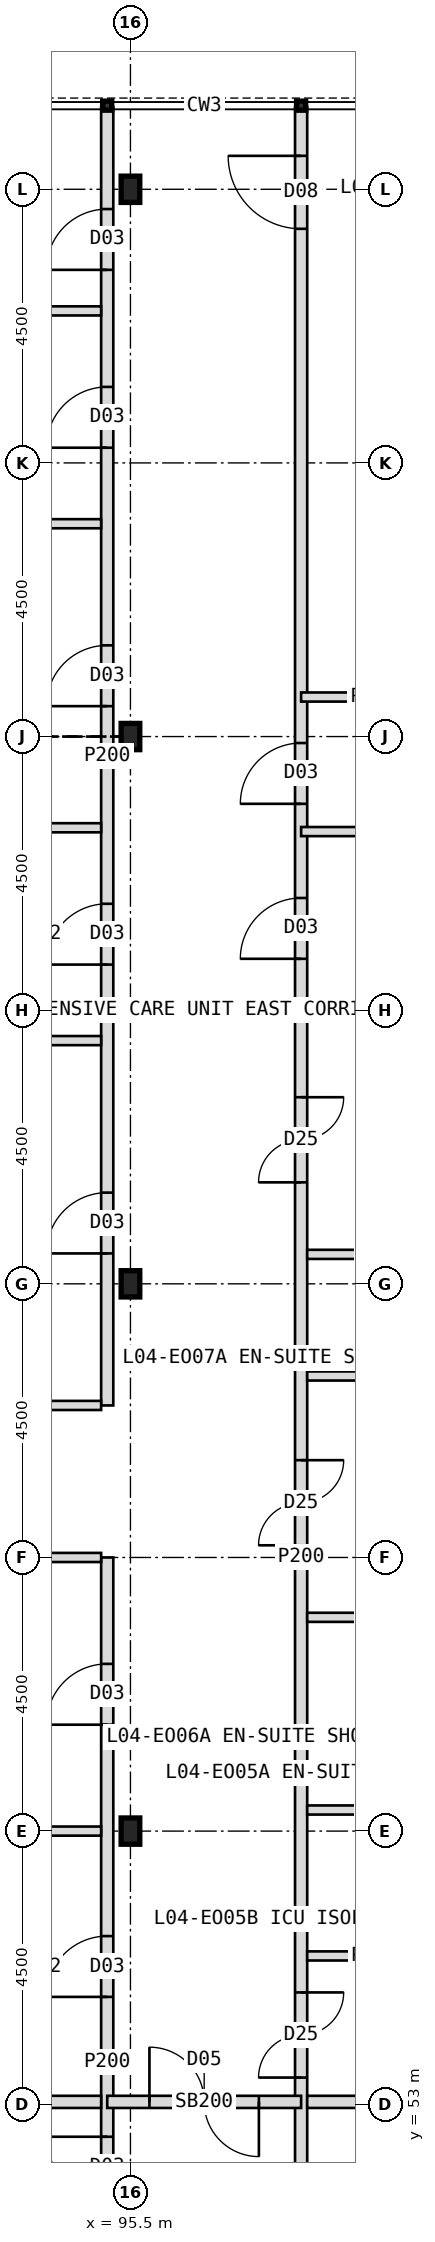
"""IFC4 building model, lengths in metres.
Left out: names, types, materials, properties, quantities, classifications, styles, units other than length and angle.
Written with IfcOpenShell. Run it as: python <this file> out.ifc"""

import sys

from ifc_helpers import new_model, si_unit, direction, frame, frame_2d, origin, origin_2d, place, context, subcontext, project, spatial, rectangle, i_section, extrude, element, fill, save


model = new_model("IFC4")
c1 = context("Model", 3, precision=1e-05, world=origin(), true_north=direction((0.0, 1.0)))
c2 = subcontext(c1, "Body", "Model", "MODEL_VIEW")
j1 = project(units=[si_unit("LENGTHUNIT", "METRE"), si_unit("PLANEANGLEUNIT", "RADIAN")], contexts=[c1])
p1 = place(None, origin())
s1 = spatial("IfcSite", under=j1, at=p1, CompositionType="ELEMENT")
p2 = place(p1, origin())
s2 = spatial("IfcBuilding", under=s1, at=p2, CompositionType="ELEMENT")
p3 = place(p2, frame((0.0, 0.0, 21.0)))
s3 = spatial("IfcBuildingStorey", under=s2, at=p3, CompositionType="ELEMENT", Elevation=21.0)
for number, where, z_axis, x_axis in (
    (1, (95.5, 57.5, 0.0), (0.0, 0.0, 1.0), (1.0, 0.0, 0.0)),
    (2, (95.5, 66.5, 0.0), (0.0, 0.0, 1.0), (1.0, 0.0, 0.0)),
    (3, (95.5, 75.5, 0.0), (0.0, 0.0, 1.0), (1.0, 0.0, 0.0)),
    (4, (95.5, 84.5, 0.0), (0.0, 0.0, 1.0), (1.0, 0.0, 0.0)),
):
    element("IfcColumn", number, at=place(p3, frame(where, z_axis=z_axis, x_axis=x_axis)), inside=s3, PredefinedType="COLUMN", context=c2, shape_type="SweptSolid", body=[
        extrude(i_section(OverallWidth=0.307, OverallDepth=0.432, WebThickness=0.021, FlangeThickness=0.04, FilletRadius=0.027, at=origin_2d()), origin(), (0.0, 0.0, 1.0), 5.0),
    ])
p4 = place(p3, frame((98.307, 38.15, 0.0), z_axis=(0.0, 0.0, 1.0), x_axis=(0.0, 1.0, 0.0)))
e5 = element("IfcWall", 5, at=p4, inside=s3, PredefinedType="PARTITIONING", context=c2, shape_type="SweptSolid", body=[
    extrude(rectangle(XDim=47.7, YDim=0.2, at=frame_2d((23.85, 0.0))), origin(), (0.0, 0.0, 1.0), 4.7),
])
p5 = place(p4, frame((45.7, 0.0, 0.0)))
e6 = element("IfcOpeningElement", 6, at=p5, cuts=e5, PredefinedType="OPENING", context=c2, shape_type="SweptSolid", body=[
    extrude(rectangle(XDim=1.2, YDim=2.1, at=frame_2d((0.6, 1.05))), frame((0.0, 0.11, 0.0), z_axis=(0.0, -1.0, 0.0), x_axis=(1.0, 0.0, 0.0)), (0.0, 0.0, 1.0), 0.22),
])
p6 = place(p4, frame((36.244, 0.0, 0.0)))
e7 = element("IfcOpeningElement", 7, at=p6, cuts=e5, PredefinedType="OPENING", context=c2, shape_type="SweptSolid", body=[
    extrude(rectangle(XDim=1.0, YDim=2.1, at=frame_2d((0.5, 1.05))), frame((0.0, 0.11, 0.0), z_axis=(0.0, -1.0, 0.0), x_axis=(1.0, 0.0, 0.0)), (0.0, 0.0, 1.0), 0.22),
])
p7 = place(p4, frame((15.297, 0.0, 0.0)))
e8 = element("IfcOpeningElement", 8, at=p7, cuts=e5, PredefinedType="OPENING", context=c2, shape_type="SweptSolid", body=[
    extrude(rectangle(XDim=1.4, YDim=2.2, at=frame_2d((0.7, 1.1))), frame((0.0, 0.11, 0.0), z_axis=(0.0, -1.0, 0.0), x_axis=(1.0, 0.0, 0.0)), (0.0, 0.0, 1.0), 0.22),
])
p8 = place(p4, frame((3.222, 0.0, 0.0)))
e9 = element("IfcOpeningElement", 9, at=p8, cuts=e5, PredefinedType="OPENING", context=c2, shape_type="SweptSolid", body=[
    extrude(rectangle(XDim=1.4, YDim=2.2, at=frame_2d((0.7, 1.1))), frame((0.0, 0.11, 0.0), z_axis=(0.0, -1.0, 0.0), x_axis=(1.0, 0.0, 0.0)), (0.0, 0.0, 1.0), 0.22),
])
p9 = place(p4, frame((9.128, 0.0, 0.0)))
e10 = element("IfcOpeningElement", 10, at=p9, cuts=e5, PredefinedType="OPENING", context=c2, shape_type="SweptSolid", body=[
    extrude(rectangle(XDim=1.4, YDim=2.2, at=frame_2d((0.7, 1.1))), frame((0.0, 0.11, 0.0), z_axis=(0.0, -1.0, 0.0), x_axis=(1.0, 0.0, 0.0)), (0.0, 0.0, 1.0), 0.22),
])
p10 = place(p4, frame((12.805, 0.0, 0.0)))
e11 = element("IfcOpeningElement", 11, at=p10, cuts=e5, PredefinedType="OPENING", context=c2, shape_type="SweptSolid", body=[
    extrude(rectangle(XDim=1.0, YDim=2.1, at=frame_2d((0.5, 1.05))), frame((0.0, 0.11, 0.0), z_axis=(0.0, -1.0, 0.0), x_axis=(1.0, 0.0, 0.0)), (0.0, 0.0, 1.0), 0.22),
])
p11 = place(p4, frame((24.05, 0.0, 0.0)))
e12 = element("IfcOpeningElement", 12, at=p11, cuts=e5, PredefinedType="OPENING", context=c2, shape_type="SweptSolid", body=[
    extrude(rectangle(XDim=1.4, YDim=2.2, at=frame_2d((0.7, 1.1))), frame((0.0, 0.11, 0.0), z_axis=(0.0, -1.0, 0.0), x_axis=(1.0, 0.0, 0.0)), (0.0, 0.0, 1.0), 0.22),
])
p12 = place(p4, frame((30.019, 0.0, 0.0)))
e13 = element("IfcOpeningElement", 13, at=p12, cuts=e5, PredefinedType="OPENING", context=c2, shape_type="SweptSolid", body=[
    extrude(rectangle(XDim=1.4, YDim=2.2, at=frame_2d((0.7, 1.1))), frame((0.0, 0.11, 0.0), z_axis=(0.0, -1.0, 0.0), x_axis=(1.0, 0.0, 0.0)), (0.0, 0.0, 1.0), 0.22),
])
p13 = place(p4, frame((33.695, 0.0, 0.0)))
e14 = element("IfcOpeningElement", 14, at=p13, cuts=e5, PredefinedType="OPENING", context=c2, shape_type="SweptSolid", body=[
    extrude(rectangle(XDim=1.0, YDim=2.1, at=frame_2d((0.5, 1.05))), frame((0.0, 0.11, 0.0), z_axis=(0.0, -1.0, 0.0), x_axis=(1.0, 0.0, 0.0)), (0.0, 0.0, 1.0), 0.22),
])
p14 = place(p3, frame((95.118, 45.4, 0.0), z_axis=(0.0, 0.0, 1.0), x_axis=(0.0, 1.0, 0.0)))
e15 = element("IfcWall", 15, at=p14, inside=s3, PredefinedType="PARTITIONING", context=c2, shape_type="SweptSolid", body=[
    extrude(rectangle(XDim=16.6, YDim=0.2, at=frame_2d((8.3, 0.0))), origin(), (0.0, 0.0, 1.0), 4.7),
])
p15 = place(p14, frame((1.15, 0.0, 0.0)))
e16 = element("IfcOpeningElement", 16, at=p15, cuts=e15, PredefinedType="OPENING", context=c2, shape_type="SweptSolid", body=[
    extrude(rectangle(XDim=1.6, YDim=2.2, at=frame_2d((0.8, 1.1))), frame((0.0, 0.11, 0.0), z_axis=(0.0, -1.0, 0.0), x_axis=(1.0, 0.0, 0.0)), (0.0, 0.0, 1.0), 0.22),
])
p16 = place(p14, frame((6.073, 0.0, 0.0)))
e17 = element("IfcOpeningElement", 17, at=p16, cuts=e15, PredefinedType="OPENING", context=c2, shape_type="SweptSolid", body=[
    extrude(rectangle(XDim=1.0, YDim=2.1, at=frame_2d((0.5, 1.05))), frame((0.0, 0.11, 0.0), z_axis=(0.0, -1.0, 0.0), x_axis=(1.0, 0.0, 0.0)), (0.0, 0.0, 1.0), 0.22),
])
p17 = place(p14, frame((9.374, 0.0, 0.0)))
e18 = element("IfcOpeningElement", 18, at=p17, cuts=e15, PredefinedType="OPENING", context=c2, shape_type="SweptSolid", body=[
    extrude(rectangle(XDim=1.0, YDim=2.1, at=frame_2d((0.5, 1.05))), frame((0.0, 0.11, 0.0), z_axis=(0.0, -1.0, 0.0), x_axis=(1.0, 0.0, 0.0)), (0.0, 0.0, 1.0), 0.22),
])
p18 = place(p14, frame((13.85, 0.0, 0.0)))
e19 = element("IfcOpeningElement", 19, at=p18, cuts=e15, PredefinedType="OPENING", context=c2, shape_type="SweptSolid", body=[
    extrude(rectangle(XDim=1.0, YDim=2.1, at=frame_2d((0.5, 1.05))), frame((0.0, 0.11, 0.0), z_axis=(0.0, -1.0, 0.0), x_axis=(1.0, 0.0, 0.0)), (0.0, 0.0, 1.0), 0.22),
])
p19 = place(p3, frame((95.118, 64.5, 0.0), z_axis=(0.0, 0.0, 1.0), x_axis=(0.0, 1.0, 0.0)))
e20 = element("IfcWall", 20, at=p19, inside=s3, PredefinedType="PARTITIONING", context=c2, shape_type="SweptSolid", body=[
    extrude(rectangle(XDim=21.35, YDim=0.2, at=frame_2d((10.675, 0.0))), origin(), (0.0, 0.0, 1.0), 4.7),
])
p20 = place(p19, frame((2.5, 0.0, 0.0)))
e21 = element("IfcOpeningElement", 21, at=p20, cuts=e20, PredefinedType="OPENING", context=c2, shape_type="SweptSolid", body=[
    extrude(rectangle(XDim=1.0, YDim=2.1, at=frame_2d((0.5, 1.05))), frame((0.0, 0.11, 0.0), z_axis=(0.0, -1.0, 0.0), x_axis=(1.0, 0.0, 0.0)), (0.0, 0.0, 1.0), 0.22),
])
p21 = place(p19, frame((7.25, 0.0, 0.0)))
e22 = element("IfcOpeningElement", 22, at=p21, cuts=e20, PredefinedType="OPENING", context=c2, shape_type="SweptSolid", body=[
    extrude(rectangle(XDim=1.0, YDim=2.1, at=frame_2d((0.5, 1.05))), frame((0.0, 0.11, 0.0), z_axis=(0.0, -1.0, 0.0), x_axis=(1.0, 0.0, 0.0)), (0.0, 0.0, 1.0), 0.22),
])
p22 = place(p19, frame((11.5, 0.0, 0.0)))
e23 = element("IfcOpeningElement", 23, at=p22, cuts=e20, PredefinedType="OPENING", context=c2, shape_type="SweptSolid", body=[
    extrude(rectangle(XDim=1.0, YDim=2.1, at=frame_2d((0.5, 1.05))), frame((0.0, 0.11, 0.0), z_axis=(0.0, -1.0, 0.0), x_axis=(1.0, 0.0, 0.0)), (0.0, 0.0, 1.0), 0.22),
])
p23 = place(p19, frame((15.75, 0.0, 0.0)))
e24 = element("IfcOpeningElement", 24, at=p23, cuts=e20, PredefinedType="OPENING", context=c2, shape_type="SweptSolid", body=[
    extrude(rectangle(XDim=1.0, YDim=2.1, at=frame_2d((0.5, 1.05))), frame((0.0, 0.11, 0.0), z_axis=(0.0, -1.0, 0.0), x_axis=(1.0, 0.0, 0.0)), (0.0, 0.0, 1.0), 0.22),
])
p24 = place(p19, frame((18.675, 0.0, 0.0)))
e25 = element("IfcOpeningElement", 25, at=p24, cuts=e20, PredefinedType="OPENING", context=c2, shape_type="SweptSolid", body=[
    extrude(rectangle(XDim=1.0, YDim=2.1, at=frame_2d((0.5, 1.05))), frame((0.0, 0.11, 0.0), z_axis=(0.0, -1.0, 0.0), x_axis=(1.0, 0.0, 0.0)), (0.0, 0.0, 1.0), 0.22),
])
p25 = place(p3, frame((98.307, 53.047, 0.0), z_axis=(0.0, 0.0, 1.0), x_axis=(-1.0, 0.0, 0.0)))
e26 = element("IfcWall", 26, at=p25, inside=s3, PredefinedType="SOLIDWALL", context=c2, shape_type="SweptSolid", body=[
    extrude(rectangle(XDim=3.189, YDim=0.2, at=frame_2d((1.594, 0.0))), origin(), (0.0, 0.0, 1.0), 4.7),
])
p26 = place(p25, frame((0.695, 0.0, 0.0)))
e27 = element("IfcOpeningElement", 27, at=p26, cuts=e26, PredefinedType="OPENING", context=c2, shape_type="SweptSolid", body=[
    extrude(rectangle(XDim=1.8, YDim=2.2, at=frame_2d((0.9, 1.1))), frame((0.0, 0.11, 0.0), z_axis=(0.0, -1.0, 0.0), x_axis=(1.0, 0.0, 0.0)), (0.0, 0.0, 1.0), 0.22),
])
p27 = place(p3, frame((100.7, 76.15, 0.0), z_axis=(0.0, 0.0, 1.0), x_axis=(-1.0, 0.0, 0.0)))
e28 = element("IfcWall", 28, at=p27, inside=s3, PredefinedType="PARTITIONING", context=c2, shape_type="SweptSolid", body=[
    extrude(rectangle(XDim=2.393, YDim=0.15, at=frame_2d((1.197, 0.0))), origin(), (0.0, 0.0, 1.0), 4.7),
])
p28 = place(p3, frame((107.85, 73.938, 0.0), z_axis=(0.0, 0.0, 1.0), x_axis=(-1.0, 0.0, 0.0)))
e29 = element("IfcWall", 29, at=p28, inside=s3, PredefinedType="PARTITIONING", context=c2, shape_type="SweptSolid", body=[
    extrude(rectangle(XDim=9.543, YDim=0.15, at=frame_2d((4.771, 0.0))), origin(), (0.0, 0.0, 1.0), 4.7),
])
p29 = place(p3, frame((107.85, 53.047, 0.0), z_axis=(0.0, 0.0, 1.0), x_axis=(-1.0, 0.0, 0.0)))
e30 = element("IfcWall", 30, at=p29, inside=s3, PredefinedType="SOLIDWALL", context=c2, shape_type="SweptSolid", body=[
    extrude(rectangle(XDim=9.443, YDim=0.2, at=frame_2d((4.722, 0.0))), origin(), (0.0, 0.0, 1.0), 4.7),
])
for number, where, z_axis, x_axis in (
    (31, (107.85, 59.016, 0.0), (0.0, 0.0, 1.0), (-1.0, 0.0, 0.0)),
    (32, (107.85, 64.984, 0.0), (0.0, 0.0, 1.0), (-1.0, 0.0, 0.0)),
    (33, (107.85, 70.953, 0.0), (0.0, 0.0, 1.0), (-1.0, 0.0, 0.0)),
):
    element("IfcWall", number, at=place(p3, frame(where, z_axis=z_axis, x_axis=x_axis)), inside=s3, PredefinedType="PARTITIONING", context=c2, shape_type="SweptSolid", body=[
        extrude(rectangle(XDim=9.443, YDim=0.15, at=frame_2d((4.722, 0.0))), origin(), (0.0, 0.0, 1.0), 4.7),
    ])
for number, where, z_axis, x_axis in (
    (34, (98.407, 55.447, 0.0), (0.0, 0.0, 1.0), (1.0, 0.0, 0.0)),
    (35, (98.407, 57.847, 0.0), (0.0, 0.0, 1.0), (1.0, 0.0, 0.0)),
    (36, (98.407, 61.016, 0.0), (0.0, 0.0, 1.0), (1.0, 0.0, 0.0)),
    (37, (98.407, 66.984, 0.0), (0.0, 0.0, 1.0), (1.0, 0.0, 0.0)),
):
    element("IfcWall", number, at=place(p3, frame(where, z_axis=z_axis, x_axis=x_axis)), inside=s3, PredefinedType="PARTITIONING", context=c2, shape_type="SweptSolid", body=[
        extrude(rectangle(XDim=2.4, YDim=0.15, at=frame_2d((1.2, 0.0))), origin(), (0.0, 0.0, 1.0), 4.7),
    ])
p30 = place(p3, frame((95.018, 53.047, 0.0), z_axis=(0.0, 0.0, 1.0), x_axis=(-1.0, 0.0, 0.0)))
e38 = element("IfcWall", 38, at=p30, inside=s3, PredefinedType="SOLIDWALL", context=c2, shape_type="SweptSolid", body=[
    extrude(rectangle(XDim=9.168, YDim=0.2, at=frame_2d((4.584, 0.0))), origin(), (0.0, 0.0, 1.0), 4.7),
])
p31 = place(p3, frame((95.018, 57.5, 0.0), z_axis=(0.0, 0.0, 1.0), x_axis=(-1.0, 0.0, 0.0)))
e39 = element("IfcWall", 39, at=p31, inside=s3, PredefinedType="PARTITIONING", context=c2, shape_type="SweptSolid", body=[
    extrude(rectangle(XDim=8.365, YDim=0.15, at=frame_2d((4.182, 0.0))), origin(), (0.0, 0.0, 1.0), 3.7),
])
for number, where, z_axis, x_axis in (
    (40, (95.018, 62.0, 0.0), (0.0, 0.0, 1.0), (-1.0, 0.0, 0.0)),
    (41, (95.018, 64.5, 0.0), (0.0, 0.0, 1.0), (-1.0, 0.0, 0.0)),
    (42, (95.018, 70.5, 0.0), (0.0, 0.0, 1.0), (-1.0, 0.0, 0.0)),
    (43, (95.018, 74.0, 0.0), (0.0, 0.0, 1.0), (-1.0, 0.0, 0.0)),
    (44, (95.018, 79.0, 0.0), (0.0, 0.0, 1.0), (-1.0, 0.0, 0.0)),
    (45, (95.018, 82.5, 0.0), (0.0, 0.0, 1.0), (-1.0, 0.0, 0.0)),
):
    element("IfcWall", number, at=place(p3, frame(where, z_axis=z_axis, x_axis=x_axis)), inside=s3, PredefinedType="PARTITIONING", context=c2, shape_type="SweptSolid", body=[
        extrude(rectangle(XDim=9.168, YDim=0.15, at=frame_2d((4.584, 0.0))), origin(), (0.0, 0.0, 1.0), 4.7),
    ])
p32 = place(p26, origin())
e46 = element("IfcDoor", 46, at=p32, inside=s3, OperationType="DOUBLE_DOOR_DOUBLE_SWING", PredefinedType="DOOR", context=c2, shape_type="SweptSolid", body=[
    extrude(rectangle(XDim=1.8, YDim=2.2, at=frame_2d((0.9, 1.1))), frame((0.0, 0.025, 0.0), z_axis=(0.0, -1.0, 0.0), x_axis=(1.0, 0.0, 0.0)), (0.0, 0.0, 1.0), 0.05),
])
fill(e27, e46)
p33 = place(p5, origin())
e47 = element("IfcDoor", 47, at=p33, inside=s3, OperationType="SINGLE_SWING_RIGHT", PredefinedType="DOOR", context=c2, shape_type="SweptSolid", body=[
    extrude(rectangle(XDim=1.2, YDim=2.1, at=frame_2d((0.6, 1.05))), frame((0.0, 0.025, 0.0), z_axis=(0.0, -1.0, 0.0), x_axis=(1.0, 0.0, 0.0)), (0.0, 0.0, 1.0), 0.05),
])
fill(e6, e47)
p34 = place(p6, origin())
e48 = element("IfcDoor", 48, at=p34, inside=s3, OperationType="SINGLE_SWING_LEFT", PredefinedType="DOOR", context=c2, shape_type="SweptSolid", body=[
    extrude(rectangle(XDim=1.0, YDim=2.1, at=frame_2d((0.5, 1.05))), frame((0.0, 0.025, 0.0), z_axis=(0.0, -1.0, 0.0), x_axis=(1.0, 0.0, 0.0)), (0.0, 0.0, 1.0), 0.05),
])
fill(e7, e48)
p35 = place(p7, origin())
e49 = element("IfcDoor", 49, at=p35, inside=s3, OperationType="DOUBLE_DOOR_SINGLE_SWING", PredefinedType="DOOR", context=c2, shape_type="SweptSolid", body=[
    extrude(rectangle(XDim=1.4, YDim=2.2, at=frame_2d((0.7, 1.1))), frame((0.0, 0.025, 0.0), z_axis=(0.0, -1.0, 0.0), x_axis=(1.0, 0.0, 0.0)), (0.0, 0.0, 1.0), 0.05),
])
fill(e8, e49)
p36 = place(p11, origin())
e50 = element("IfcDoor", 50, at=p36, inside=s3, OperationType="DOUBLE_DOOR_SINGLE_SWING", PredefinedType="DOOR", context=c2, shape_type="SweptSolid", body=[
    extrude(rectangle(XDim=1.4, YDim=2.2, at=frame_2d((0.7, 1.1))), frame((0.0, 0.025, 0.0), z_axis=(0.0, -1.0, 0.0), x_axis=(1.0, 0.0, 0.0)), (0.0, 0.0, 1.0), 0.05),
])
fill(e12, e50)
p37 = place(p12, origin())
e51 = element("IfcDoor", 51, at=p37, inside=s3, OperationType="DOUBLE_DOOR_SINGLE_SWING", PredefinedType="DOOR", context=c2, shape_type="SweptSolid", body=[
    extrude(rectangle(XDim=1.4, YDim=2.2, at=frame_2d((0.7, 1.1))), frame((0.0, 0.025, 0.0), z_axis=(0.0, -1.0, 0.0), x_axis=(1.0, 0.0, 0.0)), (0.0, 0.0, 1.0), 0.05),
])
fill(e13, e51)
p38 = place(p13, origin())
e52 = element("IfcDoor", 52, at=p38, inside=s3, OperationType="SINGLE_SWING_LEFT", PredefinedType="DOOR", context=c2, shape_type="SweptSolid", body=[
    extrude(rectangle(XDim=1.0, YDim=2.1, at=frame_2d((0.5, 1.05))), frame((0.0, 0.025, 0.0), z_axis=(0.0, -1.0, 0.0), x_axis=(1.0, 0.0, 0.0)), (0.0, 0.0, 1.0), 0.05),
])
fill(e14, e52)
p39 = place(p16, origin())
e53 = element("IfcDoor", 53, at=p39, inside=s3, OperationType="SINGLE_SWING_RIGHT", PredefinedType="DOOR", context=c2, shape_type="SweptSolid", body=[
    extrude(rectangle(XDim=1.0, YDim=2.1, at=frame_2d((0.5, 1.05))), frame((0.0, 0.025, 0.0), z_axis=(0.0, -1.0, 0.0), x_axis=(1.0, 0.0, 0.0)), (0.0, 0.0, 1.0), 0.05),
])
fill(e17, e53)
p40 = place(p17, origin())
e54 = element("IfcDoor", 54, at=p40, inside=s3, OperationType="SINGLE_SWING_LEFT", PredefinedType="DOOR", context=c2, shape_type="SweptSolid", body=[
    extrude(rectangle(XDim=1.0, YDim=2.1, at=frame_2d((0.5, 1.05))), frame((0.0, 0.025, 0.0), z_axis=(0.0, -1.0, 0.0), x_axis=(1.0, 0.0, 0.0)), (0.0, 0.0, 1.0), 0.05),
])
fill(e18, e54)
p41 = place(p18, origin())
e55 = element("IfcDoor", 55, at=p41, inside=s3, OperationType="SINGLE_SWING_LEFT", PredefinedType="DOOR", context=c2, shape_type="SweptSolid", body=[
    extrude(rectangle(XDim=1.0, YDim=2.1, at=frame_2d((0.5, 1.05))), frame((0.0, 0.025, 0.0), z_axis=(0.0, -1.0, 0.0), x_axis=(1.0, 0.0, 0.0)), (0.0, 0.0, 1.0), 0.05),
])
fill(e19, e55)
p42 = place(p20, origin())
e56 = element("IfcDoor", 56, at=p42, inside=s3, OperationType="SINGLE_SWING_LEFT", PredefinedType="DOOR", context=c2, shape_type="SweptSolid", body=[
    extrude(rectangle(XDim=1.0, YDim=2.1, at=frame_2d((0.5, 1.05))), frame((0.0, 0.025, 0.0), z_axis=(0.0, -1.0, 0.0), x_axis=(1.0, 0.0, 0.0)), (0.0, 0.0, 1.0), 0.05),
])
fill(e21, e56)
p43 = place(p21, origin())
e57 = element("IfcDoor", 57, at=p43, inside=s3, OperationType="SINGLE_SWING_LEFT", PredefinedType="DOOR", context=c2, shape_type="SweptSolid", body=[
    extrude(rectangle(XDim=1.0, YDim=2.1, at=frame_2d((0.5, 1.05))), frame((0.0, 0.025, 0.0), z_axis=(0.0, -1.0, 0.0), x_axis=(1.0, 0.0, 0.0)), (0.0, 0.0, 1.0), 0.05),
])
fill(e22, e57)
p44 = place(p22, origin())
e58 = element("IfcDoor", 58, at=p44, inside=s3, OperationType="SINGLE_SWING_LEFT", PredefinedType="DOOR", context=c2, shape_type="SweptSolid", body=[
    extrude(rectangle(XDim=1.0, YDim=2.1, at=frame_2d((0.5, 1.05))), frame((0.0, 0.025, 0.0), z_axis=(0.0, -1.0, 0.0), x_axis=(1.0, 0.0, 0.0)), (0.0, 0.0, 1.0), 0.05),
])
fill(e23, e58)
p45 = place(p23, origin())
e59 = element("IfcDoor", 59, at=p45, inside=s3, OperationType="SINGLE_SWING_LEFT", PredefinedType="DOOR", context=c2, shape_type="SweptSolid", body=[
    extrude(rectangle(XDim=1.0, YDim=2.1, at=frame_2d((0.5, 1.05))), frame((0.0, 0.025, 0.0), z_axis=(0.0, -1.0, 0.0), x_axis=(1.0, 0.0, 0.0)), (0.0, 0.0, 1.0), 0.05),
])
fill(e24, e59)
p46 = place(p24, origin())
e60 = element("IfcDoor", 60, at=p46, inside=s3, OperationType="SINGLE_SWING_LEFT", PredefinedType="DOOR", context=c2, shape_type="SweptSolid", body=[
    extrude(rectangle(XDim=1.0, YDim=2.1, at=frame_2d((0.5, 1.05))), frame((0.0, 0.025, 0.0), z_axis=(0.0, -1.0, 0.0), x_axis=(1.0, 0.0, 0.0)), (0.0, 0.0, 1.0), 0.05),
])
fill(e25, e60)
save(model, sys.argv[1])
